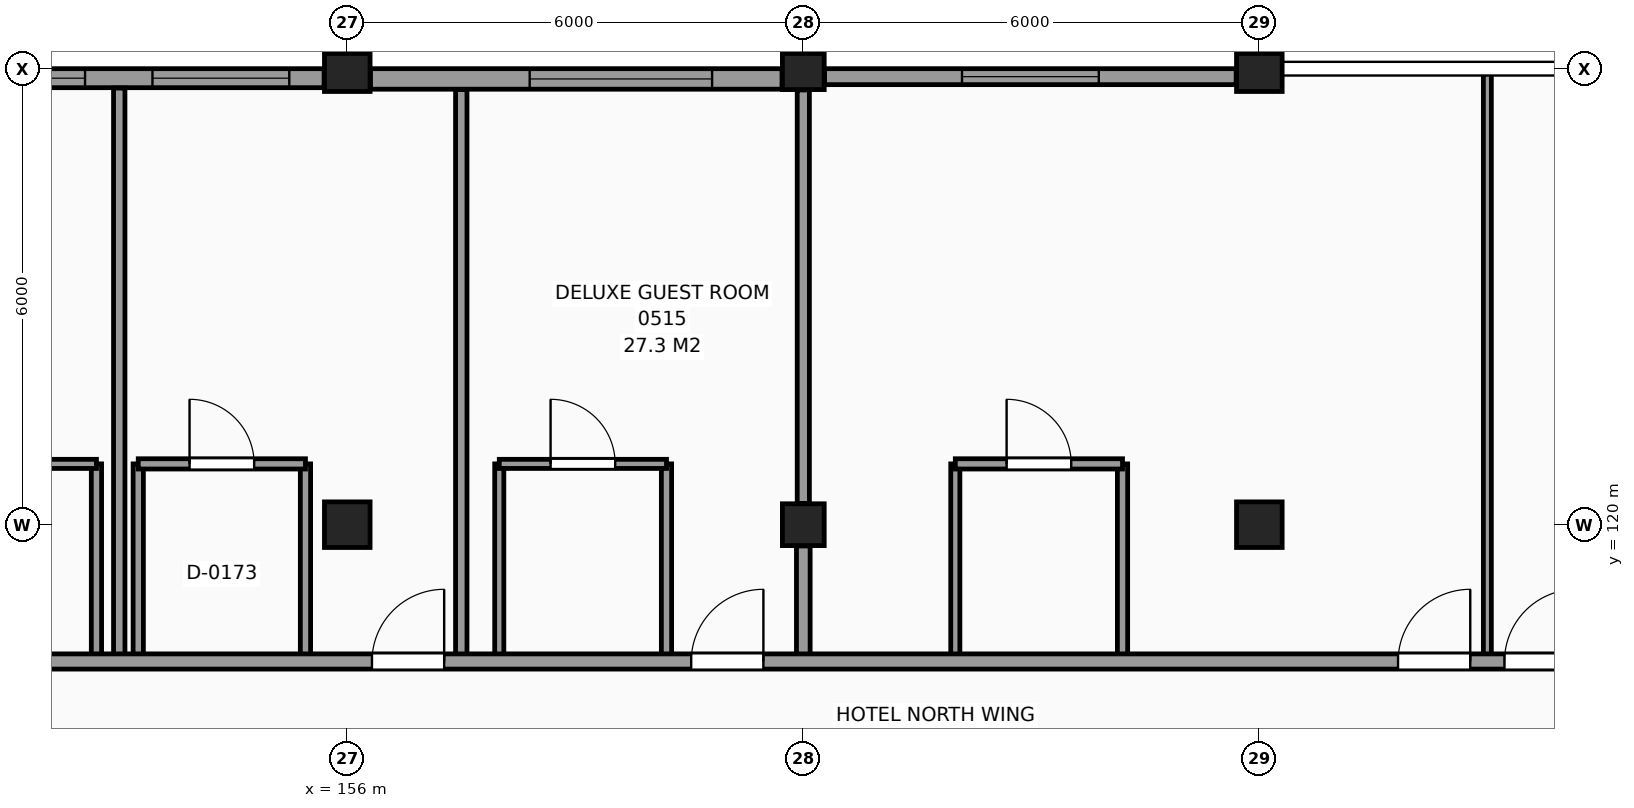
"""IFC4 building model, lengths in metres.
Left out: names, types, materials, properties, quantities, classifications, styles, units other than length and angle.
Written with IfcOpenShell. Run it as: python <this file> out.ifc"""

import sys

from ifc_helpers import new_model, si_unit, direction, frame, frame_2d, origin, origin_2d, place, context, subcontext, project, spatial, rectangle, extrude, element, fill, save


model = new_model("IFC4")
c1 = context("Model", 3, precision=1e-05, world=origin(), true_north=direction((0.0, 1.0)))
c2 = subcontext(c1, "Body", "Model", "MODEL_VIEW")
j1 = project(units=[si_unit("LENGTHUNIT", "METRE"), si_unit("PLANEANGLEUNIT", "RADIAN")], contexts=[c1])
p1 = place(None, origin())
s1 = spatial("IfcSite", under=j1, at=p1, CompositionType="ELEMENT")
p2 = place(p1, origin())
s2 = spatial("IfcBuilding", under=s1, at=p2, CompositionType="ELEMENT")
p3 = place(p2, frame((0.0, 0.0, 24.6)))
s3 = spatial("IfcBuildingStorey", under=s2, at=p3, CompositionType="ELEMENT", Elevation=24.6)
for number, where, z_axis, x_axis in (
    (1, (156.0, 120.0, 0.0), (0.0, 0.0, 1.0), (1.0, 0.0, 0.0)),
    (2, (156.0, 126.0, 0.0), (0.0, 0.0, 1.0), (1.0, 0.0, 0.0)),
):
    element("IfcColumn", number, at=place(p3, frame(where, z_axis=z_axis, x_axis=x_axis)), inside=s3, PredefinedType="COLUMN", context=c2, shape_type="SweptSolid", body=[
        extrude(rectangle(XDim=0.6, YDim=0.6, at=origin_2d()), origin(), (0.0, 0.0, 1.0), 3.6),
    ])
for number, where, z_axis, x_axis in (
    (3, (162.0, 120.0, 0.0), (0.0, 0.0, 1.0), (1.0, 0.0, 0.0)),
    (4, (162.0, 126.0, 0.0), (0.0, 0.0, 1.0), (1.0, 0.0, 0.0)),
):
    element("IfcColumn", number, at=place(p3, frame(where, z_axis=z_axis, x_axis=x_axis)), inside=s3, PredefinedType="COLUMN", context=c2, shape_type="SweptSolid", body=[
        extrude(rectangle(XDim=0.55, YDim=0.55, at=origin_2d()), origin(), (0.0, 0.0, 1.0), 3.6),
    ])
for number, where, z_axis, x_axis in (
    (5, (168.0, 120.0, 0.0), (0.0, 0.0, 1.0), (1.0, 0.0, 0.0)),
    (6, (168.0, 126.0, 0.0), (0.0, 0.0, 1.0), (1.0, 0.0, 0.0)),
):
    element("IfcColumn", number, at=place(p3, frame(where, z_axis=z_axis, x_axis=x_axis)), inside=s3, PredefinedType="COLUMN", context=c2, shape_type="SweptSolid", body=[
        extrude(rectangle(XDim=0.6, YDim=0.6, at=origin_2d()), origin(), (0.0, 0.0, 1.0), 3.6),
    ])
p4 = place(p3, frame((167.695, 125.895, 0.0), z_axis=(0.0, 0.0, 1.0), x_axis=(-1.0, 0.0, 0.0)))
e7 = element("IfcWall", 7, at=p4, inside=s3, PredefinedType="SOLIDWALL", context=c2, shape_type="SweptSolid", body=[
    extrude(rectangle(XDim=5.415, YDim=0.21, at=frame_2d((2.708, 0.0))), origin(), (0.0, 0.0, 1.0), 2.73),
])
p5 = place(p4, frame((1.807, 0.0, 0.8)))
e8 = element("IfcOpeningElement", 8, at=p5, cuts=e7, PredefinedType="OPENING", context=c2, shape_type="SweptSolid", body=[
    extrude(rectangle(XDim=1.8, YDim=1.7, at=frame_2d((0.9, 0.85))), frame((0.0, 0.115, 0.0), z_axis=(0.0, -1.0, 0.0), x_axis=(1.0, 0.0, 0.0)), (0.0, 0.0, 1.0), 0.23),
])
p6 = place(p3, frame((161.72, 125.865, 0.0), z_axis=(0.0, 0.0, 1.0), x_axis=(-1.0, 0.0, 0.0)))
e9 = element("IfcWall", 9, at=p6, inside=s3, PredefinedType="SOLIDWALL", context=c2, shape_type="SweptSolid", body=[
    extrude(rectangle(XDim=5.415, YDim=0.27, at=frame_2d((2.708, 0.0))), origin(), (0.0, 0.0, 1.0), 2.73),
])
p7 = place(p6, frame((0.92, 0.0, 0.8)))
e10 = element("IfcOpeningElement", 10, at=p7, cuts=e9, PredefinedType="OPENING", context=c2, shape_type="SweptSolid", body=[
    extrude(rectangle(XDim=2.4, YDim=1.75, at=frame_2d((1.2, 0.875))), frame((0.0, 0.145, 0.0), z_axis=(0.0, -1.0, 0.0), x_axis=(1.0, 0.0, 0.0)), (0.0, 0.0, 1.0), 0.29),
])
p8 = place(p3, frame((155.695, 125.875, 0.0), z_axis=(0.0, 0.0, 1.0), x_axis=(-1.0, 0.0, 0.0)))
e11 = element("IfcWall", 11, at=p8, inside=s3, PredefinedType="SOLIDWALL", context=c2, shape_type="SweptSolid", body=[
    extrude(rectangle(XDim=5.415, YDim=0.25, at=frame_2d((2.708, 0.0))), origin(), (0.0, 0.0, 1.0), 2.73),
])
p9 = place(p8, frame((3.145, 0.0, 0.8)))
e12 = element("IfcOpeningElement", 12, at=p9, cuts=e11, PredefinedType="OPENING", context=c2, shape_type="SweptSolid", body=[
    extrude(rectangle(XDim=1.8, YDim=1.7, at=frame_2d((0.9, 0.85))), frame((0.0, 0.135, 0.0), z_axis=(0.0, -1.0, 0.0), x_axis=(1.0, 0.0, 0.0)), (0.0, 0.0, 1.0), 0.27),
])
p10 = place(p8, frame((0.458, 0.0, 0.8)))
e13 = element("IfcOpeningElement", 13, at=p10, cuts=e11, PredefinedType="OPENING", context=c2, shape_type="SweptSolid", body=[
    extrude(rectangle(XDim=1.8, YDim=1.7, at=frame_2d((0.9, 0.85))), frame((0.0, 0.135, 0.0), z_axis=(0.0, -1.0, 0.0), x_axis=(1.0, 0.0, 0.0)), (0.0, 0.0, 1.0), 0.27),
])
p11 = place(p3, frame((152.7, 118.2, 0.0), z_axis=(0.0, 0.0, 1.0), x_axis=(0.0, 1.0, 0.0)))
e14 = element("IfcWall", 14, at=p11, inside=s3, PredefinedType="PARTITIONING", context=c2, shape_type="SweptSolid", body=[
    extrude(rectangle(XDim=2.6, YDim=0.135, at=frame_2d((1.3, 0.0))), origin(), (0.0, 0.0, 1.0), 3.38),
])
p12 = place(p3, frame((153.0, 118.2, 0.0), z_axis=(0.0, 0.0, 1.0), x_axis=(0.0, 1.0, 0.0)))
e15 = element("IfcWall", 15, at=p12, inside=s3, PredefinedType="PARTITIONING", context=c2, shape_type="SweptSolid", body=[
    extrude(rectangle(XDim=7.545, YDim=0.15, at=frame_2d((3.772, 0.0))), origin(), (0.0, 0.0, 1.0), 3.38),
])
for number, where, z_axis, x_axis in (
    (16, (153.25, 118.2, 0.0), (0.0, 0.0, 1.0), (0.0, 1.0, 0.0)),
    (17, (155.45, 118.2, 0.0), (0.0, 0.0, 1.0), (0.0, 1.0, 0.0)),
):
    element("IfcWall", number, at=place(p3, frame(where, z_axis=z_axis, x_axis=x_axis)), inside=s3, PredefinedType="PARTITIONING", context=c2, shape_type="SweptSolid", body=[
        extrude(rectangle(XDim=2.6, YDim=0.135, at=frame_2d((1.3, 0.0))), origin(), (0.0, 0.0, 1.0), 3.38),
    ])
p13 = place(p3, frame((157.5, 118.2, 0.0), z_axis=(0.0, 0.0, 1.0), x_axis=(0.0, 1.0, 0.0)))
e18 = element("IfcWall", 18, at=p13, inside=s3, PredefinedType="PARTITIONING", context=c2, shape_type="SweptSolid", body=[
    extrude(rectangle(XDim=7.525, YDim=0.15, at=frame_2d((3.763, 0.0))), origin(), (0.0, 0.0, 1.0), 3.38),
])
p14 = place(p3, frame((158.0, 118.2, 0.0), z_axis=(0.0, 0.0, 1.0), x_axis=(0.0, 1.0, 0.0)))
e19 = element("IfcWall", 19, at=p14, inside=s3, PredefinedType="PARTITIONING", context=c2, shape_type="SweptSolid", body=[
    extrude(rectangle(XDim=2.6, YDim=0.12, at=frame_2d((1.3, 0.0))), origin(), (0.0, 0.0, 1.0), 3.38),
])
p15 = place(p3, frame((160.2, 118.2, 0.0), z_axis=(0.0, 0.0, 1.0), x_axis=(0.0, 1.0, 0.0)))
e20 = element("IfcWall", 20, at=p15, inside=s3, PredefinedType="PARTITIONING", context=c2, shape_type="SweptSolid", body=[
    extrude(rectangle(XDim=2.6, YDim=0.135, at=frame_2d((1.3, 0.0))), origin(), (0.0, 0.0, 1.0), 3.38),
])
p16 = place(p3, frame((162.0, 118.2, 0.0), z_axis=(0.0, 0.0, 1.0), x_axis=(0.0, 1.0, 0.0)))
e21 = element("IfcWall", 21, at=p16, inside=s3, PredefinedType="PARTITIONING", context=c2, shape_type="SweptSolid", body=[
    extrude(rectangle(XDim=1.52, YDim=0.18, at=frame_2d((0.76, 0.0))), origin(), (0.0, 0.0, 1.0), 2.58),
])
p17 = place(p3, frame((162.0, 120.28, 0.0), z_axis=(0.0, 0.0, 1.0), x_axis=(0.0, 1.0, 0.0)))
e22 = element("IfcWall", 22, at=p17, inside=s3, PredefinedType="PARTITIONING", context=c2, shape_type="SweptSolid", body=[
    extrude(rectangle(XDim=5.44, YDim=0.16, at=frame_2d((2.72, 0.0))), origin(), (0.0, 0.0, 1.0), 2.68),
])
p18 = place(p3, frame((164.0, 118.2, 0.0), z_axis=(0.0, 0.0, 1.0), x_axis=(0.0, 1.0, 0.0)))
e23 = element("IfcWall", 23, at=p18, inside=s3, PredefinedType="PARTITIONING", context=c2, shape_type="SweptSolid", body=[
    extrude(rectangle(XDim=2.6, YDim=0.12, at=frame_2d((1.3, 0.0))), origin(), (0.0, 0.0, 1.0), 3.38),
])
p19 = place(p3, frame((166.2, 118.2, 0.0), z_axis=(0.0, 0.0, 1.0), x_axis=(0.0, 1.0, 0.0)))
e24 = element("IfcWall", 24, at=p19, inside=s3, PredefinedType="PARTITIONING", context=c2, shape_type="SweptSolid", body=[
    extrude(rectangle(XDim=2.6, YDim=0.135, at=frame_2d((1.3, 0.0))), origin(), (0.0, 0.0, 1.0), 3.38),
])
p20 = place(p3, frame((171.0, 118.2, 0.0), z_axis=(0.0, 0.0, 1.0), x_axis=(0.0, 1.0, 0.0)))
e25 = element("IfcWall", 25, at=p20, inside=s3, PredefinedType="PARTITIONING", context=c2, shape_type="SweptSolid", body=[
    extrude(rectangle(XDim=7.755, YDim=0.105, at=frame_2d((3.877, 0.0))), origin(), (0.0, 0.0, 1.0), 3.38),
])
p21 = place(p3, frame((66.255, 118.2, 0.0), z_axis=(0.0, 0.0, 1.0), x_axis=(1.0, 0.0, 0.0)))
e26 = element("IfcWall", 26, at=p21, inside=s3, PredefinedType="PARTITIONING", context=c2, shape_type="SweptSolid", body=[
    extrude(rectangle(XDim=110.245, YDim=0.2, at=frame_2d((55.123, 0.0))), origin(), (0.0, 0.0, 1.0), 3.38),
])
p22 = place(p21, frame((7.57, 0.0, 0.0)))
e27 = element("IfcOpeningElement", 27, at=p22, cuts=e26, PredefinedType="OPENING", context=c2, shape_type="SweptSolid", body=[
    extrude(rectangle(XDim=0.95, YDim=2.1, at=frame_2d((0.475, 1.05))), frame((0.0, 0.11, 0.0), z_axis=(0.0, -1.0, 0.0), x_axis=(1.0, 0.0, 0.0)), (0.0, 0.0, 1.0), 0.22),
])
p23 = place(p21, frame((12.07, 0.0, 0.0)))
e28 = element("IfcOpeningElement", 28, at=p23, cuts=e26, PredefinedType="OPENING", context=c2, shape_type="SweptSolid", body=[
    extrude(rectangle(XDim=0.95, YDim=2.1, at=frame_2d((0.475, 1.05))), frame((0.0, 0.11, 0.0), z_axis=(0.0, -1.0, 0.0), x_axis=(1.0, 0.0, 0.0)), (0.0, 0.0, 1.0), 0.22),
])
p24 = place(p21, frame((16.27, 0.0, 0.0)))
e29 = element("IfcOpeningElement", 29, at=p24, cuts=e26, PredefinedType="OPENING", context=c2, shape_type="SweptSolid", body=[
    extrude(rectangle(XDim=0.95, YDim=2.1, at=frame_2d((0.475, 1.05))), frame((0.0, 0.11, 0.0), z_axis=(0.0, -1.0, 0.0), x_axis=(1.0, 0.0, 0.0)), (0.0, 0.0, 1.0), 0.22),
])
p25 = place(p21, frame((18.47, 0.0, 0.0)))
e30 = element("IfcOpeningElement", 30, at=p25, cuts=e26, PredefinedType="OPENING", context=c2, shape_type="SweptSolid", body=[
    extrude(rectangle(XDim=0.95, YDim=2.1, at=frame_2d((0.475, 1.05))), frame((0.0, 0.11, 0.0), z_axis=(0.0, -1.0, 0.0), x_axis=(1.0, 0.0, 0.0)), (0.0, 0.0, 1.0), 0.22),
])
p26 = place(p21, frame((32.32, 0.0, 0.0)))
e31 = element("IfcOpeningElement", 31, at=p26, cuts=e26, PredefinedType="OPENING", context=c2, shape_type="SweptSolid", body=[
    extrude(rectangle(XDim=0.95, YDim=2.1, at=frame_2d((0.475, 1.05))), frame((0.0, 0.11, 0.0), z_axis=(0.0, -1.0, 0.0), x_axis=(1.0, 0.0, 0.0)), (0.0, 0.0, 1.0), 0.22),
])
p27 = place(p21, frame((36.47, 0.0, 0.0)))
e32 = element("IfcOpeningElement", 32, at=p27, cuts=e26, PredefinedType="OPENING", context=c2, shape_type="SweptSolid", body=[
    extrude(rectangle(XDim=0.95, YDim=2.1, at=frame_2d((0.475, 1.05))), frame((0.0, 0.11, 0.0), z_axis=(0.0, -1.0, 0.0), x_axis=(1.0, 0.0, 0.0)), (0.0, 0.0, 1.0), 0.22),
])
p28 = place(p21, frame((46.27, 0.0, 0.0)))
e33 = element("IfcOpeningElement", 33, at=p28, cuts=e26, PredefinedType="OPENING", context=c2, shape_type="SweptSolid", body=[
    extrude(rectangle(XDim=0.95, YDim=2.1, at=frame_2d((0.475, 1.05))), frame((0.0, 0.11, 0.0), z_axis=(0.0, -1.0, 0.0), x_axis=(1.0, 0.0, 0.0)), (0.0, 0.0, 1.0), 0.22),
])
p29 = place(p21, frame((48.47, 0.0, 0.0)))
e34 = element("IfcOpeningElement", 34, at=p29, cuts=e26, PredefinedType="OPENING", context=c2, shape_type="SweptSolid", body=[
    extrude(rectangle(XDim=0.95, YDim=2.1, at=frame_2d((0.475, 1.05))), frame((0.0, 0.11, 0.0), z_axis=(0.0, -1.0, 0.0), x_axis=(1.0, 0.0, 0.0)), (0.0, 0.0, 1.0), 0.22),
])
p30 = place(p21, frame((52.87, 0.0, 0.0)))
e35 = element("IfcOpeningElement", 35, at=p30, cuts=e26, PredefinedType="OPENING", context=c2, shape_type="SweptSolid", body=[
    extrude(rectangle(XDim=0.95, YDim=2.1, at=frame_2d((0.475, 1.05))), frame((0.0, 0.11, 0.0), z_axis=(0.0, -1.0, 0.0), x_axis=(1.0, 0.0, 0.0)), (0.0, 0.0, 1.0), 0.22),
])
p31 = place(p21, frame((60.07, 0.0, 0.0)))
e36 = element("IfcOpeningElement", 36, at=p31, cuts=e26, PredefinedType="OPENING", context=c2, shape_type="SweptSolid", body=[
    extrude(rectangle(XDim=0.95, YDim=2.1, at=frame_2d((0.475, 1.05))), frame((0.0, 0.11, 0.0), z_axis=(0.0, -1.0, 0.0), x_axis=(1.0, 0.0, 0.0)), (0.0, 0.0, 1.0), 0.22),
])
p32 = place(p21, frame((68.32, 0.0, 0.0)))
e37 = element("IfcOpeningElement", 37, at=p32, cuts=e26, PredefinedType="OPENING", context=c2, shape_type="SweptSolid", body=[
    extrude(rectangle(XDim=0.95, YDim=2.1, at=frame_2d((0.475, 1.05))), frame((0.0, 0.11, 0.0), z_axis=(0.0, -1.0, 0.0), x_axis=(1.0, 0.0, 0.0)), (0.0, 0.0, 1.0), 0.22),
])
p33 = place(p21, frame((80.32, 0.0, 0.0)))
e38 = element("IfcOpeningElement", 38, at=p33, cuts=e26, PredefinedType="OPENING", context=c2, shape_type="SweptSolid", body=[
    extrude(rectangle(XDim=0.95, YDim=2.1, at=frame_2d((0.475, 1.05))), frame((0.0, 0.11, 0.0), z_axis=(0.0, -1.0, 0.0), x_axis=(1.0, 0.0, 0.0)), (0.0, 0.0, 1.0), 0.22),
])
p34 = place(p21, frame((82.87, 0.0, 0.0)))
e39 = element("IfcOpeningElement", 39, at=p34, cuts=e26, PredefinedType="OPENING", context=c2, shape_type="SweptSolid", body=[
    extrude(rectangle(XDim=0.95, YDim=2.1, at=frame_2d((0.475, 1.05))), frame((0.0, 0.11, 0.0), z_axis=(0.0, -1.0, 0.0), x_axis=(1.0, 0.0, 0.0)), (0.0, 0.0, 1.0), 0.22),
])
p35 = place(p21, frame((90.07, 0.0, 0.0)))
e40 = element("IfcOpeningElement", 40, at=p35, cuts=e26, PredefinedType="OPENING", context=c2, shape_type="SweptSolid", body=[
    extrude(rectangle(XDim=0.95, YDim=2.1, at=frame_2d((0.475, 1.05))), frame((0.0, 0.11, 0.0), z_axis=(0.0, -1.0, 0.0), x_axis=(1.0, 0.0, 0.0)), (0.0, 0.0, 1.0), 0.22),
])
p36 = place(p21, frame((94.27, 0.0, 0.0)))
e41 = element("IfcOpeningElement", 41, at=p36, cuts=e26, PredefinedType="OPENING", context=c2, shape_type="SweptSolid", body=[
    extrude(rectangle(XDim=0.95, YDim=2.1, at=frame_2d((0.475, 1.05))), frame((0.0, 0.11, 0.0), z_axis=(0.0, -1.0, 0.0), x_axis=(1.0, 0.0, 0.0)), (0.0, 0.0, 1.0), 0.22),
])
p37 = place(p21, frame((103.57, 0.0, 0.0)))
e42 = element("IfcOpeningElement", 42, at=p37, cuts=e26, PredefinedType="OPENING", context=c2, shape_type="SweptSolid", body=[
    extrude(rectangle(XDim=0.95, YDim=2.1, at=frame_2d((0.475, 1.05))), frame((0.0, 0.11, 0.0), z_axis=(0.0, -1.0, 0.0), x_axis=(1.0, 0.0, 0.0)), (0.0, 0.0, 1.0), 0.22),
])
p38 = place(p21, frame((104.97, 0.0, 0.0)))
e43 = element("IfcOpeningElement", 43, at=p38, cuts=e26, PredefinedType="OPENING", context=c2, shape_type="SweptSolid", body=[
    extrude(rectangle(XDim=0.95, YDim=2.1, at=frame_2d((0.475, 1.05))), frame((0.0, 0.11, 0.0), z_axis=(0.0, -1.0, 0.0), x_axis=(1.0, 0.0, 0.0)), (0.0, 0.0, 1.0), 0.22),
])
p39 = place(p3, frame((150.5, 120.8, 0.0), z_axis=(0.0, 0.0, 1.0), x_axis=(1.0, 0.0, 0.0)))
e44 = element("IfcWall", 44, at=p39, inside=s3, PredefinedType="PARTITIONING", context=c2, shape_type="SweptSolid", body=[
    extrude(rectangle(XDim=2.2, YDim=0.12, at=frame_2d((1.1, 0.0))), origin(), (0.0, 0.0, 1.0), 3.38),
])
p40 = place(p39, frame((0.675, 0.0, 0.0)))
e45 = element("IfcOpeningElement", 45, at=p40, cuts=e44, PredefinedType="OPENING", context=c2, shape_type="SweptSolid", body=[
    extrude(rectangle(XDim=0.85, YDim=2.1, at=frame_2d((0.425, 1.05))), frame((0.0, 0.07, 0.0), z_axis=(0.0, -1.0, 0.0), x_axis=(1.0, 0.0, 0.0)), (0.0, 0.0, 1.0), 0.14),
])
p41 = place(p3, frame((153.25, 120.8, 0.0), z_axis=(0.0, 0.0, 1.0), x_axis=(1.0, 0.0, 0.0)))
e46 = element("IfcWall", 46, at=p41, inside=s3, PredefinedType="PARTITIONING", context=c2, shape_type="SweptSolid", body=[
    extrude(rectangle(XDim=2.2, YDim=0.135, at=frame_2d((1.1, 0.0))), origin(), (0.0, 0.0, 1.0), 3.38),
])
p42 = place(p41, frame((0.675, 0.0, 0.0)))
e47 = element("IfcOpeningElement", 47, at=p42, cuts=e46, PredefinedType="OPENING", context=c2, shape_type="SweptSolid", body=[
    extrude(rectangle(XDim=0.85, YDim=2.1, at=frame_2d((0.425, 1.05))), frame((0.0, 0.078, 0.0), z_axis=(0.0, -1.0, 0.0), x_axis=(1.0, 0.0, 0.0)), (0.0, 0.0, 1.0), 0.155),
])
p43 = place(p3, frame((158.0, 120.8, 0.0), z_axis=(0.0, 0.0, 1.0), x_axis=(1.0, 0.0, 0.0)))
e48 = element("IfcWall", 48, at=p43, inside=s3, PredefinedType="PARTITIONING", context=c2, shape_type="SweptSolid", body=[
    extrude(rectangle(XDim=2.2, YDim=0.12, at=frame_2d((1.1, 0.0))), origin(), (0.0, 0.0, 1.0), 3.38),
])
p44 = place(p43, frame((0.675, 0.0, 0.0)))
e49 = element("IfcOpeningElement", 49, at=p44, cuts=e48, PredefinedType="OPENING", context=c2, shape_type="SweptSolid", body=[
    extrude(rectangle(XDim=0.85, YDim=2.1, at=frame_2d((0.425, 1.05))), frame((0.0, 0.07, 0.0), z_axis=(0.0, -1.0, 0.0), x_axis=(1.0, 0.0, 0.0)), (0.0, 0.0, 1.0), 0.14),
])
p45 = place(p3, frame((164.0, 120.8, 0.0), z_axis=(0.0, 0.0, 1.0), x_axis=(1.0, 0.0, 0.0)))
e50 = element("IfcWall", 50, at=p45, inside=s3, PredefinedType="PARTITIONING", context=c2, shape_type="SweptSolid", body=[
    extrude(rectangle(XDim=2.2, YDim=0.135, at=frame_2d((1.1, 0.0))), origin(), (0.0, 0.0, 1.0), 3.38),
])
p46 = place(p45, frame((0.675, 0.0, 0.0)))
e51 = element("IfcOpeningElement", 51, at=p46, cuts=e50, PredefinedType="OPENING", context=c2, shape_type="SweptSolid", body=[
    extrude(rectangle(XDim=0.85, YDim=2.1, at=frame_2d((0.425, 1.05))), frame((0.0, 0.078, 0.0), z_axis=(0.0, -1.0, 0.0), x_axis=(1.0, 0.0, 0.0)), (0.0, 0.0, 1.0), 0.155),
])
p47 = place(p9, origin())
e52 = element("IfcWindow", 52, at=p47, inside=s3, PartitioningType="SINGLE_PANEL", PredefinedType="WINDOW", context=c2, shape_type="SweptSolid", body=[
    extrude(rectangle(XDim=1.8, YDim=1.7, at=frame_2d((0.9, 0.85))), frame((0.0, 0.03, 0.0), z_axis=(0.0, -1.0, 0.0), x_axis=(1.0, 0.0, 0.0)), (0.0, 0.0, 1.0), 0.06),
])
fill(e12, e52)
p48 = place(p10, origin())
e53 = element("IfcWindow", 53, at=p48, inside=s3, PartitioningType="SINGLE_PANEL", PredefinedType="WINDOW", context=c2, shape_type="SweptSolid", body=[
    extrude(rectangle(XDim=1.8, YDim=1.7, at=frame_2d((0.9, 0.85))), frame((0.0, 0.03, 0.0), z_axis=(0.0, -1.0, 0.0), x_axis=(1.0, 0.0, 0.0)), (0.0, 0.0, 1.0), 0.06),
])
fill(e13, e53)
p49 = place(p7, origin())
e54 = element("IfcWindow", 54, at=p49, inside=s3, PartitioningType="SINGLE_PANEL", PredefinedType="WINDOW", context=c2, shape_type="SweptSolid", body=[
    extrude(rectangle(XDim=2.4, YDim=1.75, at=frame_2d((1.2, 0.875))), frame((0.0, 0.03, 0.0), z_axis=(0.0, -1.0, 0.0), x_axis=(1.0, 0.0, 0.0)), (0.0, 0.0, 1.0), 0.06),
])
fill(e10, e54)
p50 = place(p5, origin())
e55 = element("IfcWindow", 55, at=p50, inside=s3, PartitioningType="SINGLE_PANEL", PredefinedType="WINDOW", context=c2, shape_type="SweptSolid", body=[
    extrude(rectangle(XDim=1.8, YDim=1.7, at=frame_2d((0.9, 0.85))), frame((0.0, 0.03, 0.0), z_axis=(0.0, -1.0, 0.0), x_axis=(1.0, 0.0, 0.0)), (0.0, 0.0, 1.0), 0.06),
])
fill(e8, e55)
p51 = place(p42, origin())
e56 = element("IfcDoor", 56, at=p51, inside=s3, OperationType="SINGLE_SWING_LEFT", PredefinedType="DOOR", context=c2, shape_type="SweptSolid", body=[
    extrude(rectangle(XDim=0.85, YDim=2.1, at=frame_2d((0.425, 1.05))), frame((0.0, 0.025, 0.0), z_axis=(0.0, -1.0, 0.0), x_axis=(1.0, 0.0, 0.0)), (0.0, 0.0, 1.0), 0.05),
])
fill(e47, e56)
p52 = place(p35, origin())
e57 = element("IfcDoor", 57, at=p52, inside=s3, OperationType="SINGLE_SWING_RIGHT", PredefinedType="DOOR", context=c2, shape_type="SweptSolid", body=[
    extrude(rectangle(XDim=0.95, YDim=2.1, at=frame_2d((0.475, 1.05))), frame((0.0, 0.025, 0.0), z_axis=(0.0, -1.0, 0.0), x_axis=(1.0, 0.0, 0.0)), (0.0, 0.0, 1.0), 0.05),
])
fill(e40, e57)
p53 = place(p44, origin())
e58 = element("IfcDoor", 58, at=p53, inside=s3, OperationType="SINGLE_SWING_LEFT", PredefinedType="DOOR", context=c2, shape_type="SweptSolid", body=[
    extrude(rectangle(XDim=0.85, YDim=2.1, at=frame_2d((0.425, 1.05))), frame((0.0, 0.025, 0.0), z_axis=(0.0, -1.0, 0.0), x_axis=(1.0, 0.0, 0.0)), (0.0, 0.0, 1.0), 0.05),
])
fill(e49, e58)
p54 = place(p36, origin())
e59 = element("IfcDoor", 59, at=p54, inside=s3, OperationType="SINGLE_SWING_RIGHT", PredefinedType="DOOR", context=c2, shape_type="SweptSolid", body=[
    extrude(rectangle(XDim=0.95, YDim=2.1, at=frame_2d((0.475, 1.05))), frame((0.0, 0.025, 0.0), z_axis=(0.0, -1.0, 0.0), x_axis=(1.0, 0.0, 0.0)), (0.0, 0.0, 1.0), 0.05),
])
fill(e41, e59)
p55 = place(p46, origin())
e60 = element("IfcDoor", 60, at=p55, inside=s3, OperationType="SINGLE_SWING_LEFT", PredefinedType="DOOR", context=c2, shape_type="SweptSolid", body=[
    extrude(rectangle(XDim=0.85, YDim=2.1, at=frame_2d((0.425, 1.05))), frame((0.0, 0.025, 0.0), z_axis=(0.0, -1.0, 0.0), x_axis=(1.0, 0.0, 0.0)), (0.0, 0.0, 1.0), 0.05),
])
fill(e51, e60)
p56 = place(p37, origin())
e61 = element("IfcDoor", 61, at=p56, inside=s3, OperationType="SINGLE_SWING_RIGHT", PredefinedType="DOOR", context=c2, shape_type="SweptSolid", body=[
    extrude(rectangle(XDim=0.95, YDim=2.1, at=frame_2d((0.475, 1.05))), frame((0.0, 0.025, 0.0), z_axis=(0.0, -1.0, 0.0), x_axis=(1.0, 0.0, 0.0)), (0.0, 0.0, 1.0), 0.05),
])
fill(e42, e61)
p57 = place(p38, origin())
e62 = element("IfcDoor", 62, at=p57, inside=s3, OperationType="SINGLE_SWING_RIGHT", PredefinedType="DOOR", context=c2, shape_type="SweptSolid", body=[
    extrude(rectangle(XDim=0.95, YDim=2.1, at=frame_2d((0.475, 1.05))), frame((0.0, 0.025, 0.0), z_axis=(0.0, -1.0, 0.0), x_axis=(1.0, 0.0, 0.0)), (0.0, 0.0, 1.0), 0.05),
])
fill(e43, e62)
save(model, sys.argv[1])
